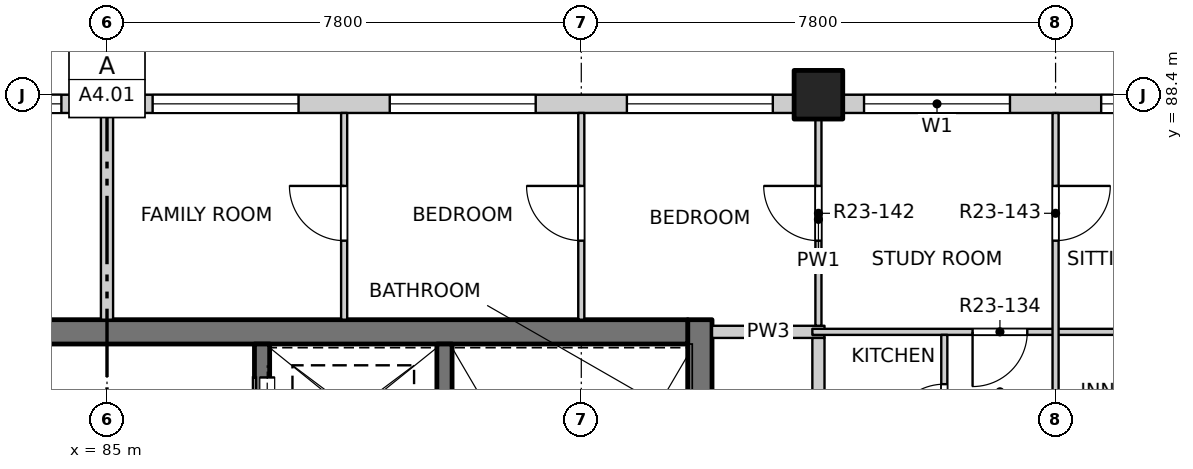
"""IFC4 building model, lengths in metres.
Left out: names, types, materials, properties, quantities, classifications, styles, units other than length and angle.
Written with IfcOpenShell. Run it as: python <this file> out.ifc"""

import sys

from ifc_helpers import new_model, si_unit, direction, frame, frame_2d, origin, origin_2d, place, context, subcontext, project, spatial, rectangle, extrude, element, fill, save


model = new_model("IFC4")
c1 = context("Model", 3, precision=1e-05, world=origin(), true_north=direction((0.0, 1.0)))
c2 = subcontext(c1, "Body", "Model", "MODEL_VIEW")
j1 = project(units=[si_unit("LENGTHUNIT", "METRE"), si_unit("PLANEANGLEUNIT", "RADIAN")], contexts=[c1])
p1 = place(None, origin())
s1 = spatial("IfcSite", under=j1, at=p1, CompositionType="ELEMENT")
p2 = place(p1, origin())
s2 = spatial("IfcBuilding", under=s1, at=p2, CompositionType="ELEMENT")
p3 = place(p2, frame((0.0, 0.0, 238.1)))
s3 = spatial("IfcBuildingStorey", under=s2, at=p3, CompositionType="ELEMENT", Elevation=238.1)
p4 = place(p3, frame((96.7, 88.4, -0.25), z_axis=(0.0, 0.0, 1.0), x_axis=(1.0, 0.0, 0.0)))
e1 = element("IfcColumn", 1, at=p4, inside=s3, PredefinedType="COLUMN", context=c2, shape_type="SweptSolid", body=[
    extrude(rectangle(XDim=0.8, YDim=0.8, at=origin_2d()), origin(), (0.0, 0.0, 1.0), 3.35),
])
p5 = place(p3, frame((94.75, 77.3, -0.25), z_axis=(0.0, 0.0, 1.0), x_axis=(0.0, 1.0, 0.0)))
e2 = element("IfcWall", 2, at=p5, inside=s3, PredefinedType="SOLIDWALL", context=c2, shape_type="SweptSolid", body=[
    extrude(rectangle(XDim=7.4, YDim=0.4, at=frame_2d((3.7, 0.0))), origin(), (0.0, 0.0, 1.0), 3.35),
])
p6 = place(p5, frame((0.3, 0.0, 0.25)))
e3 = element("IfcOpeningElement", 3, at=p6, cuts=e2, PredefinedType="OPENING", context=c2, shape_type="SweptSolid", body=[
    extrude(rectangle(XDim=1.2, YDim=2.1, at=frame_2d((0.6, 1.05))), frame((0.0, 0.21, 0.0), z_axis=(0.0, -1.0, 0.0), x_axis=(1.0, 0.0, 0.0)), (0.0, 0.0, 1.0), 0.42),
])
p7 = place(p3, frame((75.45, 84.5, -0.25), z_axis=(0.0, 0.0, 1.0), x_axis=(1.0, 0.0, 0.0)))
e4 = element("IfcWall", 4, at=p7, inside=s3, PredefinedType="SOLIDWALL", context=c2, shape_type="SweptSolid", body=[
    extrude(rectangle(XDim=19.1, YDim=0.4, at=frame_2d((9.55, 0.0))), origin(), (0.0, 0.0, 1.0), 3.35),
])
p8 = place(p3, frame((90.55, 77.3, -0.25), z_axis=(0.0, 0.0, 1.0), x_axis=(0.0, 1.0, 0.0)))
e5 = element("IfcWall", 5, at=p8, inside=s3, PredefinedType="SOLIDWALL", context=c2, shape_type="SweptSolid", body=[
    extrude(rectangle(XDim=7.0, YDim=0.25, at=frame_2d((3.5, 0.0))), origin(), (0.0, 0.0, 1.0), 3.35),
])
p9 = place(p3, frame((87.55, 82.025, -0.25), z_axis=(0.0, 0.0, 1.0), x_axis=(0.0, 1.0, 0.0)))
e6 = element("IfcWall", 6, at=p9, inside=s3, PredefinedType="SOLIDWALL", context=c2, shape_type="SweptSolid", body=[
    extrude(rectangle(XDim=2.275, YDim=0.25, at=frame_2d((1.138, 0.0))), origin(), (0.0, 0.0, 1.0), 3.35),
])
p10 = place(p9, frame((0.625, 0.0, 0.25)))
e7 = element("IfcOpeningElement", 7, at=p10, cuts=e6, PredefinedType="OPENING", context=c2, shape_type="SweptSolid", body=[
    extrude(rectangle(XDim=1.1, YDim=2.1, at=frame_2d((0.55, 1.05))), frame((0.0, 0.135, 0.0), z_axis=(0.0, -1.0, 0.0), x_axis=(1.0, 0.0, 0.0)), (0.0, 0.0, 1.0), 0.27),
])
p11 = place(p3, frame((73.7, 88.25, 0.0), z_axis=(0.0, 0.0, 1.0), x_axis=(1.0, 0.0, 0.0)))
e8 = element("IfcWall", 8, at=p11, inside=s3, PredefinedType="SOLIDWALL", context=c2, shape_type="SweptSolid", body=[
    extrude(rectangle(XDim=22.6, YDim=0.3, at=frame_2d((11.3, 0.0))), origin(), (0.0, 0.0, 1.0), 3.1),
])
p12 = place(p11, frame((0.35, 0.0, 0.9)))
e9 = element("IfcOpeningElement", 9, at=p12, cuts=e8, PredefinedType="OPENING", context=c2, shape_type="SweptSolid", body=[
    extrude(rectangle(XDim=2.4, YDim=1.8, at=frame_2d((1.2, 0.9))), frame((0.0, 0.16, 0.0), z_axis=(0.0, -1.0, 0.0), x_axis=(1.0, 0.0, 0.0)), (0.0, 0.0, 1.0), 0.32),
])
p13 = place(p11, frame((4.25, 0.0, 0.9)))
e10 = element("IfcOpeningElement", 10, at=p13, cuts=e8, PredefinedType="OPENING", context=c2, shape_type="SweptSolid", body=[
    extrude(rectangle(XDim=2.4, YDim=1.8, at=frame_2d((1.2, 0.9))), frame((0.0, 0.16, 0.0), z_axis=(0.0, -1.0, 0.0), x_axis=(1.0, 0.0, 0.0)), (0.0, 0.0, 1.0), 0.32),
])
p14 = place(p11, frame((8.15, 0.0, 0.9)))
e11 = element("IfcOpeningElement", 11, at=p14, cuts=e8, PredefinedType="OPENING", context=c2, shape_type="SweptSolid", body=[
    extrude(rectangle(XDim=2.4, YDim=1.8, at=frame_2d((1.2, 0.9))), frame((0.0, 0.16, 0.0), z_axis=(0.0, -1.0, 0.0), x_axis=(1.0, 0.0, 0.0)), (0.0, 0.0, 1.0), 0.32),
])
p15 = place(p11, frame((12.05, 0.0, 0.9)))
e12 = element("IfcOpeningElement", 12, at=p15, cuts=e8, PredefinedType="OPENING", context=c2, shape_type="SweptSolid", body=[
    extrude(rectangle(XDim=2.4, YDim=1.8, at=frame_2d((1.2, 0.9))), frame((0.0, 0.16, 0.0), z_axis=(0.0, -1.0, 0.0), x_axis=(1.0, 0.0, 0.0)), (0.0, 0.0, 1.0), 0.32),
])
p16 = place(p11, frame((15.95, 0.0, 0.9)))
e13 = element("IfcOpeningElement", 13, at=p16, cuts=e8, PredefinedType="OPENING", context=c2, shape_type="SweptSolid", body=[
    extrude(rectangle(XDim=2.4, YDim=1.8, at=frame_2d((1.2, 0.9))), frame((0.0, 0.16, 0.0), z_axis=(0.0, -1.0, 0.0), x_axis=(1.0, 0.0, 0.0)), (0.0, 0.0, 1.0), 0.32),
])
p17 = place(p11, frame((19.85, 0.0, 0.9)))
e14 = element("IfcOpeningElement", 14, at=p17, cuts=e8, PredefinedType="OPENING", context=c2, shape_type="SweptSolid", body=[
    extrude(rectangle(XDim=2.4, YDim=1.8, at=frame_2d((1.2, 0.9))), frame((0.0, 0.16, 0.0), z_axis=(0.0, -1.0, 0.0), x_axis=(1.0, 0.0, 0.0)), (0.0, 0.0, 1.0), 0.32),
])
p18 = place(p3, frame((97.1, 88.25, 0.0), z_axis=(0.0, 0.0, 1.0), x_axis=(1.0, 0.0, 0.0)))
e15 = element("IfcWall", 15, at=p18, inside=s3, PredefinedType="SOLIDWALL", context=c2, shape_type="SweptSolid", body=[
    extrude(rectangle(XDim=7.4, YDim=0.3, at=frame_2d((3.7, 0.0))), origin(), (0.0, 0.0, 1.0), 3.1),
])
p19 = place(p18, frame((0.35, 0.0, 0.9)))
e16 = element("IfcOpeningElement", 16, at=p19, cuts=e15, PredefinedType="OPENING", context=c2, shape_type="SweptSolid", body=[
    extrude(rectangle(XDim=2.4, YDim=1.8, at=frame_2d((1.2, 0.9))), frame((0.0, 0.16, 0.0), z_axis=(0.0, -1.0, 0.0), x_axis=(1.0, 0.0, 0.0)), (0.0, 0.0, 1.0), 0.32),
])
p20 = place(p18, frame((4.25, 0.0, 0.9)))
e17 = element("IfcOpeningElement", 17, at=p20, cuts=e15, PredefinedType="OPENING", context=c2, shape_type="SweptSolid", body=[
    extrude(rectangle(XDim=2.4, YDim=1.8, at=frame_2d((1.2, 0.9))), frame((0.0, 0.16, 0.0), z_axis=(0.0, -1.0, 0.0), x_axis=(1.0, 0.0, 0.0)), (0.0, 0.0, 1.0), 0.32),
])
p21 = place(p3, frame((94.95, 84.5, 0.0), z_axis=(0.0, 0.0, 1.0), x_axis=(1.0, 0.0, 0.0)))
e18 = element("IfcWall", 18, at=p21, inside=s3, PredefinedType="PARTITIONING", context=c2, shape_type="SweptSolid", body=[
    extrude(rectangle(XDim=1.85, YDim=0.2, at=frame_2d((0.925, 0.0))), origin(), (0.0, 0.0, 1.0), 3.1),
])
p22 = place(p3, frame((96.6, 84.5, 0.0), z_axis=(0.0, 0.0, 1.0), x_axis=(1.0, 0.0, 0.0)))
e19 = element("IfcWall", 19, at=p22, inside=s3, PredefinedType="PARTITIONING", context=c2, shape_type="SweptSolid", body=[
    extrude(rectangle(XDim=11.5, YDim=0.1, at=frame_2d((5.75, 0.0))), origin(), (0.0, 0.0, 1.0), 3.1),
])
p23 = place(p22, frame((2.635, 0.0, 0.0)))
e20 = element("IfcOpeningElement", 20, at=p23, cuts=e19, PredefinedType="OPENING", context=c2, shape_type="SweptSolid", body=[
    extrude(rectangle(XDim=0.9, YDim=2.1, at=frame_2d((0.45, 1.05))), frame((0.0, 0.06, 0.0), z_axis=(0.0, -1.0, 0.0), x_axis=(1.0, 0.0, 0.0)), (0.0, 0.0, 1.0), 0.12),
])
p24 = place(p3, frame((85.0, 84.7, 0.0), z_axis=(0.0, 0.0, 1.0), x_axis=(0.0, 1.0, 0.0)))
e21 = element("IfcWall", 21, at=p24, inside=s3, PredefinedType="PARTITIONING", context=c2, shape_type="SweptSolid", body=[
    extrude(rectangle(XDim=3.4, YDim=0.2, at=frame_2d((1.7, 0.0))), origin(), (0.0, 0.0, 1.0), 3.1),
])
p25 = place(p3, frame((88.9, 84.7, 0.0), z_axis=(0.0, 0.0, 1.0), x_axis=(0.0, 1.0, 0.0)))
e22 = element("IfcWall", 22, at=p25, inside=s3, PredefinedType="PARTITIONING", context=c2, shape_type="SweptSolid", body=[
    extrude(rectangle(XDim=3.4, YDim=0.1, at=frame_2d((1.7, 0.0))), origin(), (0.0, 0.0, 1.0), 3.1),
])
p26 = place(p25, frame((1.3, 0.0, 0.0)))
e23 = element("IfcOpeningElement", 23, at=p26, cuts=e22, PredefinedType="OPENING", context=c2, shape_type="SweptSolid", body=[
    extrude(rectangle(XDim=0.9, YDim=2.1, at=frame_2d((0.45, 1.05))), frame((0.0, 0.06, 0.0), z_axis=(0.0, -1.0, 0.0), x_axis=(1.0, 0.0, 0.0)), (0.0, 0.0, 1.0), 0.12),
])
p27 = place(p3, frame((92.8, 84.7, 0.0), z_axis=(0.0, 0.0, 1.0), x_axis=(0.0, 1.0, 0.0)))
e24 = element("IfcWall", 24, at=p27, inside=s3, PredefinedType="PARTITIONING", context=c2, shape_type="SweptSolid", body=[
    extrude(rectangle(XDim=3.4, YDim=0.1, at=frame_2d((1.7, 0.0))), origin(), (0.0, 0.0, 1.0), 3.1),
])
p28 = place(p27, frame((1.3, 0.0, 0.0)))
e25 = element("IfcOpeningElement", 25, at=p28, cuts=e24, PredefinedType="OPENING", context=c2, shape_type="SweptSolid", body=[
    extrude(rectangle(XDim=0.9, YDim=2.1, at=frame_2d((0.45, 1.05))), frame((0.0, 0.06, 0.0), z_axis=(0.0, -1.0, 0.0), x_axis=(1.0, 0.0, 0.0)), (0.0, 0.0, 1.0), 0.12),
])
p29 = place(p3, frame((96.7, 49.5, 0.0), z_axis=(0.0, 0.0, 1.0), x_axis=(0.0, 1.0, 0.0)))
e26 = element("IfcWall", 26, at=p29, inside=s3, PredefinedType="PARTITIONING", context=c2, shape_type="SweptSolid", body=[
    extrude(rectangle(XDim=34.9, YDim=0.2, at=frame_2d((17.45, 0.0))), origin(), (0.0, 0.0, 1.0), 3.1),
])
p30 = place(p29, frame((3.175, 0.0, 0.0)))
e27 = element("IfcOpeningElement", 27, at=p30, cuts=e26, PredefinedType="OPENING", context=c2, shape_type="SweptSolid", body=[
    extrude(rectangle(XDim=1.0, YDim=2.1, at=frame_2d((0.5, 1.05))), frame((0.0, 0.11, 0.0), z_axis=(0.0, -1.0, 0.0), x_axis=(1.0, 0.0, 0.0)), (0.0, 0.0, 1.0), 0.22),
])
p31 = place(p29, frame((14.625, 0.0, 0.0)))
e28 = element("IfcOpeningElement", 28, at=p31, cuts=e26, PredefinedType="OPENING", context=c2, shape_type="SweptSolid", body=[
    extrude(rectangle(XDim=1.0, YDim=2.1, at=frame_2d((0.5, 1.05))), frame((0.0, 0.11, 0.0), z_axis=(0.0, -1.0, 0.0), x_axis=(1.0, 0.0, 0.0)), (0.0, 0.0, 1.0), 0.22),
])
p32 = place(p29, frame((30.175, 0.0, 0.0)))
e29 = element("IfcOpeningElement", 29, at=p32, cuts=e26, PredefinedType="OPENING", context=c2, shape_type="SweptSolid", body=[
    extrude(rectangle(XDim=1.0, YDim=2.1, at=frame_2d((0.5, 1.05))), frame((0.0, 0.11, 0.0), z_axis=(0.0, -1.0, 0.0), x_axis=(1.0, 0.0, 0.0)), (0.0, 0.0, 1.0), 0.22),
])
p33 = place(p3, frame((96.7, 84.6, 0.0), z_axis=(0.0, 0.0, 1.0), x_axis=(0.0, 1.0, 0.0)))
e30 = element("IfcWall", 30, at=p33, inside=s3, PredefinedType="PARTITIONING", context=c2, shape_type="SweptSolid", body=[
    extrude(rectangle(XDim=3.5, YDim=0.1, at=frame_2d((1.75, 0.0))), origin(), (0.0, 0.0, 1.0), 3.1),
])
p34 = place(p33, frame((1.4, 0.0, 0.0)))
e31 = element("IfcOpeningElement", 31, at=p34, cuts=e30, PredefinedType="OPENING", context=c2, shape_type="SweptSolid", body=[
    extrude(rectangle(XDim=0.9, YDim=2.1, at=frame_2d((0.45, 1.05))), frame((0.0, 0.06, 0.0), z_axis=(0.0, -1.0, 0.0), x_axis=(1.0, 0.0, 0.0)), (0.0, 0.0, 1.0), 0.12),
])
p35 = place(p3, frame((98.77, 79.55, 0.0), z_axis=(0.0, 0.0, 1.0), x_axis=(0.0, 1.0, 0.0)))
e32 = element("IfcWall", 32, at=p35, inside=s3, PredefinedType="PARTITIONING", context=c2, shape_type="SweptSolid", body=[
    extrude(rectangle(XDim=4.9, YDim=0.1, at=frame_2d((2.45, 0.0))), origin(), (0.0, 0.0, 1.0), 3.1),
])
p36 = place(p35, frame((0.69, 0.0, 0.0)))
e33 = element("IfcOpeningElement", 33, at=p36, cuts=e32, PredefinedType="OPENING", context=c2, shape_type="SweptSolid", body=[
    extrude(rectangle(XDim=0.9, YDim=2.1, at=frame_2d((0.45, 1.05))), frame((0.0, 0.06, 0.0), z_axis=(0.0, -1.0, 0.0), x_axis=(1.0, 0.0, 0.0)), (0.0, 0.0, 1.0), 0.12),
])
p37 = place(p35, frame((3.19, 0.0, 0.0)))
e34 = element("IfcOpeningElement", 34, at=p37, cuts=e32, PredefinedType="OPENING", context=c2, shape_type="SweptSolid", body=[
    extrude(rectangle(XDim=0.9, YDim=2.1, at=frame_2d((0.45, 1.05))), frame((0.0, 0.06, 0.0), z_axis=(0.0, -1.0, 0.0), x_axis=(1.0, 0.0, 0.0)), (0.0, 0.0, 1.0), 0.12),
])
p38 = place(p3, frame((100.6, 41.9, 0.0), z_axis=(0.0, 0.0, 1.0), x_axis=(0.0, 1.0, 0.0)))
e35 = element("IfcWall", 35, at=p38, inside=s3, PredefinedType="PARTITIONING", context=c2, shape_type="SweptSolid", body=[
    extrude(rectangle(XDim=46.2, YDim=0.1, at=frame_2d((23.1, 0.0))), origin(), (0.0, 0.0, 1.0), 3.1),
])
p39 = place(p38, frame((1.2, 0.0, 0.0)))
e36 = element("IfcOpeningElement", 36, at=p39, cuts=e35, PredefinedType="OPENING", context=c2, shape_type="SweptSolid", body=[
    extrude(rectangle(XDim=0.9, YDim=2.1, at=frame_2d((0.45, 1.05))), frame((0.0, 0.06, 0.0), z_axis=(0.0, -1.0, 0.0), x_axis=(1.0, 0.0, 0.0)), (0.0, 0.0, 1.0), 0.12),
])
p40 = place(p38, frame((6.025, 0.0, 0.0)))
e37 = element("IfcOpeningElement", 37, at=p40, cuts=e35, PredefinedType="OPENING", context=c2, shape_type="SweptSolid", body=[
    extrude(rectangle(XDim=0.9, YDim=2.1, at=frame_2d((0.45, 1.05))), frame((0.0, 0.06, 0.0), z_axis=(0.0, -1.0, 0.0), x_axis=(1.0, 0.0, 0.0)), (0.0, 0.0, 1.0), 0.12),
])
p41 = place(p38, frame((9.975, 0.0, 0.0)))
e38 = element("IfcOpeningElement", 38, at=p41, cuts=e35, PredefinedType="OPENING", context=c2, shape_type="SweptSolid", body=[
    extrude(rectangle(XDim=0.9, YDim=2.1, at=frame_2d((0.45, 1.05))), frame((0.0, 0.06, 0.0), z_axis=(0.0, -1.0, 0.0), x_axis=(1.0, 0.0, 0.0)), (0.0, 0.0, 1.0), 0.12),
])
p42 = place(p38, frame((12.9, 0.0, 0.0)))
e39 = element("IfcOpeningElement", 39, at=p42, cuts=e35, PredefinedType="OPENING", context=c2, shape_type="SweptSolid", body=[
    extrude(rectangle(XDim=0.9, YDim=2.1, at=frame_2d((0.45, 1.05))), frame((0.0, 0.06, 0.0), z_axis=(0.0, -1.0, 0.0), x_axis=(1.0, 0.0, 0.0)), (0.0, 0.0, 1.0), 0.12),
])
p43 = place(p38, frame((17.775, 0.0, 0.0)))
e40 = element("IfcOpeningElement", 40, at=p43, cuts=e35, PredefinedType="OPENING", context=c2, shape_type="SweptSolid", body=[
    extrude(rectangle(XDim=0.9, YDim=2.1, at=frame_2d((0.45, 1.05))), frame((0.0, 0.06, 0.0), z_axis=(0.0, -1.0, 0.0), x_axis=(1.0, 0.0, 0.0)), (0.0, 0.0, 1.0), 0.12),
])
p44 = place(p38, frame((21.625, 0.0, 0.0)))
e41 = element("IfcOpeningElement", 41, at=p44, cuts=e35, PredefinedType="OPENING", context=c2, shape_type="SweptSolid", body=[
    extrude(rectangle(XDim=0.9, YDim=2.1, at=frame_2d((0.45, 1.05))), frame((0.0, 0.06, 0.0), z_axis=(0.0, -1.0, 0.0), x_axis=(1.0, 0.0, 0.0)), (0.0, 0.0, 1.0), 0.12),
])
p45 = place(p38, frame((25.575, 0.0, 0.0)))
e42 = element("IfcOpeningElement", 42, at=p45, cuts=e35, PredefinedType="OPENING", context=c2, shape_type="SweptSolid", body=[
    extrude(rectangle(XDim=0.9, YDim=2.1, at=frame_2d((0.45, 1.05))), frame((0.0, 0.06, 0.0), z_axis=(0.0, -1.0, 0.0), x_axis=(1.0, 0.0, 0.0)), (0.0, 0.0, 1.0), 0.12),
])
p46 = place(p38, frame((28.5, 0.0, 0.0)))
e43 = element("IfcOpeningElement", 43, at=p46, cuts=e35, PredefinedType="OPENING", context=c2, shape_type="SweptSolid", body=[
    extrude(rectangle(XDim=0.9, YDim=2.1, at=frame_2d((0.45, 1.05))), frame((0.0, 0.06, 0.0), z_axis=(0.0, -1.0, 0.0), x_axis=(1.0, 0.0, 0.0)), (0.0, 0.0, 1.0), 0.12),
])
p47 = place(p38, frame((33.375, 0.0, 0.0)))
e44 = element("IfcOpeningElement", 44, at=p47, cuts=e35, PredefinedType="OPENING", context=c2, shape_type="SweptSolid", body=[
    extrude(rectangle(XDim=0.9, YDim=2.1, at=frame_2d((0.45, 1.05))), frame((0.0, 0.06, 0.0), z_axis=(0.0, -1.0, 0.0), x_axis=(1.0, 0.0, 0.0)), (0.0, 0.0, 1.0), 0.12),
])
p48 = place(p38, frame((36.3, 0.0, 0.0)))
e45 = element("IfcOpeningElement", 45, at=p48, cuts=e35, PredefinedType="OPENING", context=c2, shape_type="SweptSolid", body=[
    extrude(rectangle(XDim=0.9, YDim=2.1, at=frame_2d((0.45, 1.05))), frame((0.0, 0.06, 0.0), z_axis=(0.0, -1.0, 0.0), x_axis=(1.0, 0.0, 0.0)), (0.0, 0.0, 1.0), 0.12),
])
p49 = place(p38, frame((40.2, 0.0, 0.0)))
e46 = element("IfcOpeningElement", 46, at=p49, cuts=e35, PredefinedType="OPENING", context=c2, shape_type="SweptSolid", body=[
    extrude(rectangle(XDim=0.9, YDim=2.1, at=frame_2d((0.45, 1.05))), frame((0.0, 0.06, 0.0), z_axis=(0.0, -1.0, 0.0), x_axis=(1.0, 0.0, 0.0)), (0.0, 0.0, 1.0), 0.12),
])
p50 = place(p38, frame((44.1, 0.0, 0.0)))
e47 = element("IfcOpeningElement", 47, at=p50, cuts=e35, PredefinedType="OPENING", context=c2, shape_type="SweptSolid", body=[
    extrude(rectangle(XDim=0.9, YDim=2.1, at=frame_2d((0.45, 1.05))), frame((0.0, 0.06, 0.0), z_axis=(0.0, -1.0, 0.0), x_axis=(1.0, 0.0, 0.0)), (0.0, 0.0, 1.0), 0.12),
])
p51 = place(p14, origin())
e48 = element("IfcWindow", 48, at=p51, inside=s3, PartitioningType="DOUBLE_PANEL_VERTICAL", PredefinedType="WINDOW", context=c2, shape_type="SweptSolid", body=[
    extrude(rectangle(XDim=2.4, YDim=1.8, at=frame_2d((1.2, 0.9))), frame((0.0, 0.03, 0.0), z_axis=(0.0, -1.0, 0.0), x_axis=(1.0, 0.0, 0.0)), (0.0, 0.0, 1.0), 0.06),
])
fill(e11, e48)
p52 = place(p15, origin())
e49 = element("IfcWindow", 49, at=p52, inside=s3, PartitioningType="DOUBLE_PANEL_VERTICAL", PredefinedType="WINDOW", context=c2, shape_type="SweptSolid", body=[
    extrude(rectangle(XDim=2.4, YDim=1.8, at=frame_2d((1.2, 0.9))), frame((0.0, 0.03, 0.0), z_axis=(0.0, -1.0, 0.0), x_axis=(1.0, 0.0, 0.0)), (0.0, 0.0, 1.0), 0.06),
])
fill(e12, e49)
p53 = place(p16, origin())
e50 = element("IfcWindow", 50, at=p53, inside=s3, PartitioningType="DOUBLE_PANEL_VERTICAL", PredefinedType="WINDOW", context=c2, shape_type="SweptSolid", body=[
    extrude(rectangle(XDim=2.4, YDim=1.8, at=frame_2d((1.2, 0.9))), frame((0.0, 0.03, 0.0), z_axis=(0.0, -1.0, 0.0), x_axis=(1.0, 0.0, 0.0)), (0.0, 0.0, 1.0), 0.06),
])
fill(e13, e50)
p54 = place(p17, origin())
e51 = element("IfcWindow", 51, at=p54, inside=s3, PartitioningType="DOUBLE_PANEL_VERTICAL", PredefinedType="WINDOW", context=c2, shape_type="SweptSolid", body=[
    extrude(rectangle(XDim=2.4, YDim=1.8, at=frame_2d((1.2, 0.9))), frame((0.0, 0.03, 0.0), z_axis=(0.0, -1.0, 0.0), x_axis=(1.0, 0.0, 0.0)), (0.0, 0.0, 1.0), 0.06),
])
fill(e14, e51)
p55 = place(p19, origin())
e52 = element("IfcWindow", 52, at=p55, inside=s3, PartitioningType="DOUBLE_PANEL_VERTICAL", PredefinedType="WINDOW", context=c2, shape_type="SweptSolid", body=[
    extrude(rectangle(XDim=2.4, YDim=1.8, at=frame_2d((1.2, 0.9))), frame((0.0, 0.03, 0.0), z_axis=(0.0, -1.0, 0.0), x_axis=(1.0, 0.0, 0.0)), (0.0, 0.0, 1.0), 0.06),
])
fill(e16, e52)
p56 = place(p20, origin())
e53 = element("IfcWindow", 53, at=p56, inside=s3, PartitioningType="DOUBLE_PANEL_VERTICAL", PredefinedType="WINDOW", context=c2, shape_type="SweptSolid", body=[
    extrude(rectangle(XDim=2.4, YDim=1.8, at=frame_2d((1.2, 0.9))), frame((0.0, 0.03, 0.0), z_axis=(0.0, -1.0, 0.0), x_axis=(1.0, 0.0, 0.0)), (0.0, 0.0, 1.0), 0.06),
])
fill(e17, e53)
p57 = place(p37, origin())
e54 = element("IfcDoor", 54, at=p57, inside=s3, OperationType="SINGLE_SWING_LEFT", PredefinedType="DOOR", context=c2, shape_type="SweptSolid", body=[
    extrude(rectangle(XDim=0.9, YDim=2.1, at=frame_2d((0.45, 1.05))), frame((0.0, 0.025, 0.0), z_axis=(0.0, -1.0, 0.0), x_axis=(1.0, 0.0, 0.0)), (0.0, 0.0, 1.0), 0.05),
])
fill(e34, e54)
p58 = place(p10, origin())
e55 = element("IfcDoor", 55, at=p58, inside=s3, OperationType="SLIDING_TO_RIGHT", PredefinedType="DOOR", context=c2, shape_type="SweptSolid", body=[
    extrude(rectangle(XDim=1.1, YDim=2.1, at=frame_2d((0.55, 1.05))), frame((0.0, -0.06, 0.0), z_axis=(0.0, -1.0, 0.0), x_axis=(1.0, 0.0, 0.0)), (0.0, 0.0, 1.0), 0.05),
])
fill(e7, e55)
p59 = place(p23, origin())
e56 = element("IfcDoor", 56, at=p59, inside=s3, OperationType="SINGLE_SWING_RIGHT", PredefinedType="DOOR", context=c2, shape_type="SweptSolid", body=[
    extrude(rectangle(XDim=0.9, YDim=2.1, at=frame_2d((0.45, 1.05))), frame((0.0, 0.025, 0.0), z_axis=(0.0, -1.0, 0.0), x_axis=(1.0, 0.0, 0.0)), (0.0, 0.0, 1.0), 0.05),
])
fill(e20, e56)
p60 = place(p26, origin())
e57 = element("IfcDoor", 57, at=p60, inside=s3, OperationType="SINGLE_SWING_RIGHT", PredefinedType="DOOR", context=c2, shape_type="SweptSolid", body=[
    extrude(rectangle(XDim=0.9, YDim=2.1, at=frame_2d((0.45, 1.05))), frame((0.0, 0.025, 0.0), z_axis=(0.0, -1.0, 0.0), x_axis=(1.0, 0.0, 0.0)), (0.0, 0.0, 1.0), 0.05),
])
fill(e23, e57)
p61 = place(p28, origin())
e58 = element("IfcDoor", 58, at=p61, inside=s3, OperationType="SINGLE_SWING_RIGHT", PredefinedType="DOOR", context=c2, shape_type="SweptSolid", body=[
    extrude(rectangle(XDim=0.9, YDim=2.1, at=frame_2d((0.45, 1.05))), frame((0.0, 0.025, 0.0), z_axis=(0.0, -1.0, 0.0), x_axis=(1.0, 0.0, 0.0)), (0.0, 0.0, 1.0), 0.05),
])
fill(e25, e58)
p62 = place(p34, origin())
e59 = element("IfcDoor", 59, at=p62, inside=s3, OperationType="SINGLE_SWING_RIGHT", PredefinedType="DOOR", context=c2, shape_type="SweptSolid", body=[
    extrude(rectangle(XDim=0.9, YDim=2.1, at=frame_2d((0.45, 1.05))), frame((0.0, 0.025, 0.0), z_axis=(0.0, -1.0, 0.0), x_axis=(1.0, 0.0, 0.0)), (0.0, 0.0, 1.0), 0.05),
])
fill(e31, e59)
p63 = place(p50, origin())
e60 = element("IfcDoor", 60, at=p63, inside=s3, OperationType="SINGLE_SWING_LEFT", PredefinedType="DOOR", context=c2, shape_type="SweptSolid", body=[
    extrude(rectangle(XDim=0.9, YDim=2.1, at=frame_2d((0.45, 1.05))), frame((0.0, 0.025, 0.0), z_axis=(0.0, -1.0, 0.0), x_axis=(1.0, 0.0, 0.0)), (0.0, 0.0, 1.0), 0.05),
])
fill(e47, e60)
save(model, sys.argv[1])
